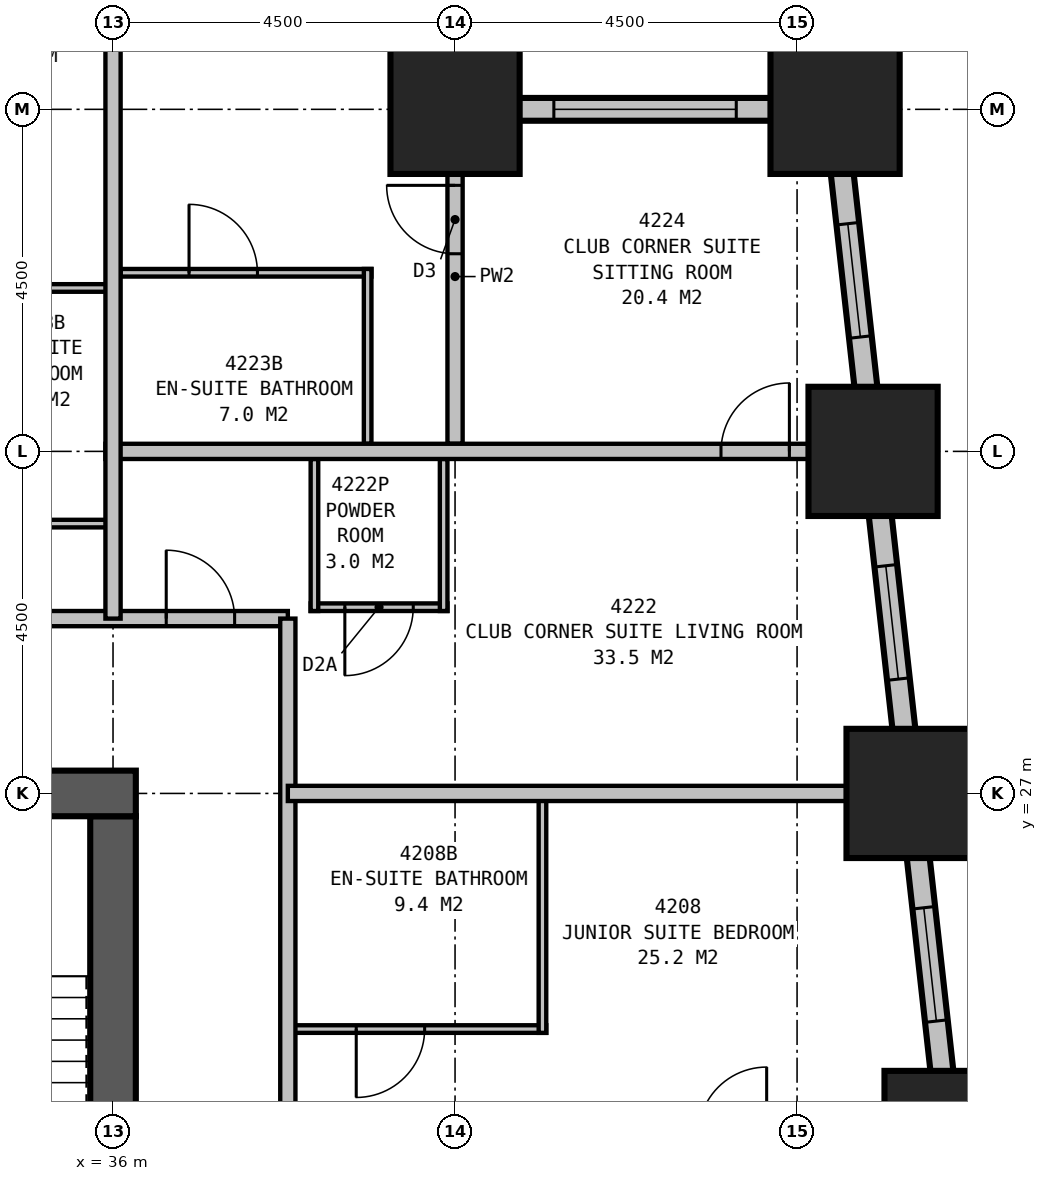
"""IFC4 building model, lengths in metres.
Left out: names, types, materials, properties, quantities, classifications, styles, units other than length and angle.
Written with IfcOpenShell. Run it as: python <this file> out.ifc"""

import sys

from ifc_helpers import new_model, si_unit, direction, frame, frame_2d, origin, origin_2d, place, context, subcontext, project, spatial, rectangle, extrude, element, fill, save


model = new_model("IFC4")
c1 = context("Model", 3, precision=1e-05, world=origin(), true_north=direction((0.0, 1.0)))
c2 = subcontext(c1, "Body", "Model", "MODEL_VIEW")
j1 = project(units=[si_unit("LENGTHUNIT", "METRE"), si_unit("PLANEANGLEUNIT", "RADIAN")], contexts=[c1])
p1 = place(None, origin())
s1 = spatial("IfcSite", under=j1, at=p1, CompositionType="ELEMENT")
p2 = place(p1, origin())
s2 = spatial("IfcBuilding", under=s1, at=p2, CompositionType="ELEMENT")
p3 = place(p2, frame((0.0, 0.0, 165.9)))
s3 = spatial("IfcBuildingStorey", under=s2, at=p3, CompositionType="ELEMENT", Elevation=165.9)
for number, where, z_axis, x_axis in (
    (1, (47.0, 22.5, 0.0), (0.0, 0.0, 1.0), (1.0, 0.0, 0.0)),
    (2, (46.5, 27.0, 0.0), (0.0, 0.0, 1.0), (1.0, 0.0, 0.0)),
    (3, (46.0, 31.5, 0.0), (0.0, 0.0, 1.0), (1.0, 0.0, 0.0)),
    (4, (45.5, 36.0, 0.0), (0.0, 0.0, 1.0), (1.0, 0.0, 0.0)),
    (5, (40.5, 36.0, 0.0), (0.0, 0.0, 1.0), (1.0, 0.0, 0.0)),
):
    element("IfcColumn", number, at=place(p3, frame(where, z_axis=z_axis, x_axis=x_axis)), inside=s3, PredefinedType="COLUMN", context=c2, shape_type="SweptSolid", body=[
        extrude(rectangle(XDim=1.7, YDim=1.7, at=origin_2d()), origin(), (0.0, 0.0, 1.0), 3.5),
    ])
p4 = place(p3, frame((36.3, 27.0, 0.0), z_axis=(0.0, 0.0, 1.0), x_axis=(-1.0, 0.0, 0.0)))
e6 = element("IfcWall", 6, at=p4, inside=s3, PredefinedType="SHEAR", context=c2, shape_type="SweptSolid", body=[
    extrude(rectangle(XDim=23.1, YDim=0.6, at=frame_2d((11.55, 0.0))), origin(), (0.0, 0.0, 1.0), 3.5),
])
p5 = place(p4, frame((17.05, 0.0, 0.0)))
e7 = element("IfcOpeningElement", 7, at=p5, cuts=e6, PredefinedType="OPENING", context=c2, shape_type="SweptSolid", body=[
    extrude(rectangle(XDim=1.0, YDim=2.1, at=frame_2d((0.5, 1.05))), frame((0.0, 0.31, 0.0), z_axis=(0.0, -1.0, 0.0), x_axis=(1.0, 0.0, 0.0)), (0.0, 0.0, 1.0), 0.62),
])
p6 = place(p4, frame((12.05, 0.0, 0.0)))
e8 = element("IfcOpeningElement", 8, at=p6, cuts=e6, PredefinedType="OPENING", context=c2, shape_type="SweptSolid", body=[
    extrude(rectangle(XDim=1.0, YDim=2.1, at=frame_2d((0.5, 1.05))), frame((0.0, 0.31, 0.0), z_axis=(0.0, -1.0, 0.0), x_axis=(1.0, 0.0, 0.0)), (0.0, 0.0, 1.0), 0.62),
])
p7 = place(p4, frame((7.05, 0.0, 0.0)))
e9 = element("IfcOpeningElement", 9, at=p7, cuts=e6, PredefinedType="OPENING", context=c2, shape_type="SweptSolid", body=[
    extrude(rectangle(XDim=1.0, YDim=2.1, at=frame_2d((0.5, 1.05))), frame((0.0, 0.31, 0.0), z_axis=(0.0, -1.0, 0.0), x_axis=(1.0, 0.0, 0.0)), (0.0, 0.0, 1.0), 0.62),
])
p8 = place(p3, frame((36.0, 20.0, 0.0), z_axis=(0.0, 0.0, 1.0), x_axis=(0.0, 1.0, 0.0)))
e10 = element("IfcWall", 10, at=p8, inside=s3, PredefinedType="SHEAR", context=c2, shape_type="SweptSolid", body=[
    extrude(rectangle(XDim=6.7, YDim=0.6, at=frame_2d((3.35, 0.0))), origin(), (0.0, 0.0, 1.0), 3.5),
])
p9 = place(p3, frame((49.017, 4.351, 0.0), z_axis=(0.0, 0.0, 1.0), x_axis=(-0.110433201132, 0.993883548555, 0.0)))
e11 = element("IfcWall", 11, at=p9, inside=s3, PredefinedType="STANDARD", context=c2, shape_type="SweptSolid", body=[
    extrude(rectangle(XDim=31.994, YDim=0.3, at=frame_2d((15.997, 0.0))), origin(), (0.0, 0.0, 1.0), 2.25),
])
p10 = place(p9, frame((1.664, 0.0, 0.5)))
e12 = element("IfcOpeningElement", 12, at=p10, cuts=e11, PredefinedType="OPENING", context=c2, shape_type="SweptSolid", body=[
    extrude(rectangle(XDim=1.5, YDim=1.6, at=frame_2d((0.75, 0.8))), frame((0.0, 0.16, 0.0), z_axis=(0.0, -1.0, 0.0), x_axis=(1.0, 0.0, 0.0)), (0.0, 0.0, 1.0), 0.32),
])
p11 = place(p9, frame((6.192, 0.0, 0.5)))
e13 = element("IfcOpeningElement", 13, at=p11, cuts=e11, PredefinedType="OPENING", context=c2, shape_type="SweptSolid", body=[
    extrude(rectangle(XDim=1.5, YDim=1.6, at=frame_2d((0.75, 0.8))), frame((0.0, 0.16, 0.0), z_axis=(0.0, -1.0, 0.0), x_axis=(1.0, 0.0, 0.0)), (0.0, 0.0, 1.0), 0.32),
])
p12 = place(p9, frame((10.719, 0.0, 0.5)))
e14 = element("IfcOpeningElement", 14, at=p12, cuts=e11, PredefinedType="OPENING", context=c2, shape_type="SweptSolid", body=[
    extrude(rectangle(XDim=1.5, YDim=1.6, at=frame_2d((0.75, 0.8))), frame((0.0, 0.16, 0.0), z_axis=(0.0, -1.0, 0.0), x_axis=(1.0, 0.0, 0.0)), (0.0, 0.0, 1.0), 0.32),
])
p13 = place(p9, frame((15.247, 0.0, 0.5)))
e15 = element("IfcOpeningElement", 15, at=p13, cuts=e11, PredefinedType="OPENING", context=c2, shape_type="SweptSolid", body=[
    extrude(rectangle(XDim=1.5, YDim=1.6, at=frame_2d((0.75, 0.8))), frame((0.0, 0.16, 0.0), z_axis=(0.0, -1.0, 0.0), x_axis=(1.0, 0.0, 0.0)), (0.0, 0.0, 1.0), 0.32),
])
p14 = place(p9, frame((19.775, 0.0, 0.5)))
e16 = element("IfcOpeningElement", 16, at=p14, cuts=e11, PredefinedType="OPENING", context=c2, shape_type="SweptSolid", body=[
    extrude(rectangle(XDim=1.5, YDim=1.6, at=frame_2d((0.75, 0.8))), frame((0.0, 0.16, 0.0), z_axis=(0.0, -1.0, 0.0), x_axis=(1.0, 0.0, 0.0)), (0.0, 0.0, 1.0), 0.32),
])
p15 = place(p9, frame((24.302, 0.0, 0.5)))
e17 = element("IfcOpeningElement", 17, at=p15, cuts=e11, PredefinedType="OPENING", context=c2, shape_type="SweptSolid", body=[
    extrude(rectangle(XDim=1.5, YDim=1.6, at=frame_2d((0.75, 0.8))), frame((0.0, 0.16, 0.0), z_axis=(0.0, -1.0, 0.0), x_axis=(1.0, 0.0, 0.0)), (0.0, 0.0, 1.0), 0.32),
])
p16 = place(p9, frame((28.83, 0.0, 0.5)))
e18 = element("IfcOpeningElement", 18, at=p16, cuts=e11, PredefinedType="OPENING", context=c2, shape_type="SweptSolid", body=[
    extrude(rectangle(XDim=1.5, YDim=1.6, at=frame_2d((0.75, 0.8))), frame((0.0, 0.16, 0.0), z_axis=(0.0, -1.0, 0.0), x_axis=(1.0, 0.0, 0.0)), (0.0, 0.0, 1.0), 0.32),
])
p17 = place(p3, frame((45.65, 36.0, 0.0), z_axis=(0.0, 0.0, 1.0), x_axis=(-1.0, 0.0, 0.0)))
e19 = element("IfcWall", 19, at=p17, inside=s3, PredefinedType="STANDARD", context=c2, shape_type="SweptSolid", body=[
    extrude(rectangle(XDim=5.3, YDim=0.3, at=frame_2d((2.65, 0.0))), origin(), (0.0, 0.0, 1.0), 2.25),
])
p18 = place(p17, frame((1.45, 0.0, 0.5)))
e20 = element("IfcOpeningElement", 20, at=p18, cuts=e19, PredefinedType="OPENING", context=c2, shape_type="SweptSolid", body=[
    extrude(rectangle(XDim=2.4, YDim=1.6, at=frame_2d((1.2, 0.8))), frame((0.0, 0.16, 0.0), z_axis=(0.0, -1.0, 0.0), x_axis=(1.0, 0.0, 0.0)), (0.0, 0.0, 1.0), 0.32),
])
p19 = place(p3, frame((40.5, 35.85, 0.0), z_axis=(0.0, 0.0, 1.0), x_axis=(0.0, 1.0, 0.0)))
e21 = element("IfcWall", 21, at=p19, inside=s3, PredefinedType="STANDARD", context=c2, shape_type="SweptSolid", body=[
    extrude(rectangle(XDim=4.8, YDim=0.3, at=frame_2d((2.4, 0.0))), origin(), (0.0, 0.0, 1.0), 2.25),
])
p20 = place(p19, frame((1.2, 0.0, 0.5)))
e22 = element("IfcOpeningElement", 22, at=p20, cuts=e21, PredefinedType="OPENING", context=c2, shape_type="SweptSolid", body=[
    extrude(rectangle(XDim=2.4, YDim=1.6, at=frame_2d((1.2, 0.8))), frame((0.0, 0.16, 0.0), z_axis=(0.0, -1.0, 0.0), x_axis=(1.0, 0.0, 0.0)), (0.0, 0.0, 1.0), 0.32),
])
p21 = place(p3, frame((11.2, 29.3, 0.0), z_axis=(0.0, 0.0, 1.0), x_axis=(1.0, 0.0, 0.0)))
e23 = element("IfcWall", 23, at=p21, inside=s3, PredefinedType="PARTITIONING", context=c2, shape_type="SweptSolid", body=[
    extrude(rectangle(XDim=27.1, YDim=0.2, at=frame_2d((13.55, 0.0))), origin(), (0.0, 0.0, 1.0), 3.25),
])
p22 = place(p21, frame((2.75, 0.0, 0.0)))
e24 = element("IfcOpeningElement", 24, at=p22, cuts=e23, PredefinedType="OPENING", context=c2, shape_type="SweptSolid", body=[
    extrude(rectangle(XDim=0.9, YDim=2.1, at=frame_2d((0.45, 1.05))), frame((0.0, 0.11, 0.0), z_axis=(0.0, -1.0, 0.0), x_axis=(1.0, 0.0, 0.0)), (0.0, 0.0, 1.0), 0.22),
])
p23 = place(p21, frame((9.55, 0.0, 0.0)))
e25 = element("IfcOpeningElement", 25, at=p23, cuts=e23, PredefinedType="OPENING", context=c2, shape_type="SweptSolid", body=[
    extrude(rectangle(XDim=0.9, YDim=2.1, at=frame_2d((0.45, 1.05))), frame((0.0, 0.11, 0.0), z_axis=(0.0, -1.0, 0.0), x_axis=(1.0, 0.0, 0.0)), (0.0, 0.0, 1.0), 0.22),
])
p24 = place(p21, frame((16.25, 0.0, 0.0)))
e26 = element("IfcOpeningElement", 26, at=p24, cuts=e23, PredefinedType="OPENING", context=c2, shape_type="SweptSolid", body=[
    extrude(rectangle(XDim=0.9, YDim=2.1, at=frame_2d((0.45, 1.05))), frame((0.0, 0.11, 0.0), z_axis=(0.0, -1.0, 0.0), x_axis=(1.0, 0.0, 0.0)), (0.0, 0.0, 1.0), 0.22),
])
p25 = place(p21, frame((20.75, 0.0, 0.0)))
e27 = element("IfcOpeningElement", 27, at=p25, cuts=e23, PredefinedType="OPENING", context=c2, shape_type="SweptSolid", body=[
    extrude(rectangle(XDim=0.9, YDim=2.1, at=frame_2d((0.45, 1.05))), frame((0.0, 0.11, 0.0), z_axis=(0.0, -1.0, 0.0), x_axis=(1.0, 0.0, 0.0)), (0.0, 0.0, 1.0), 0.22),
])
p26 = place(p21, frame((25.5, 0.0, 0.0)))
e28 = element("IfcOpeningElement", 28, at=p26, cuts=e23, PredefinedType="OPENING", context=c2, shape_type="SweptSolid", body=[
    extrude(rectangle(XDim=0.9, YDim=2.1, at=frame_2d((0.45, 1.05))), frame((0.0, 0.11, 0.0), z_axis=(0.0, -1.0, 0.0), x_axis=(1.0, 0.0, 0.0)), (0.0, 0.0, 1.0), 0.22),
])
p27 = place(p21, frame((0.7, 0.0, 0.0)))
e29 = element("IfcOpeningElement", 29, at=p27, cuts=e23, PredefinedType="OPENING", context=c2, shape_type="SweptSolid", body=[
    extrude(rectangle(XDim=0.9, YDim=2.1, at=frame_2d((0.45, 1.05))), frame((0.0, 0.11, 0.0), z_axis=(0.0, -1.0, 0.0), x_axis=(1.0, 0.0, 0.0)), (0.0, 0.0, 1.0), 0.22),
])
p28 = place(p3, frame((38.3, 10.6, 0.0), z_axis=(0.0, 0.0, 1.0), x_axis=(0.0, 1.0, 0.0)))
e30 = element("IfcWall", 30, at=p28, inside=s3, PredefinedType="PARTITIONING", context=c2, shape_type="SweptSolid", body=[
    extrude(rectangle(XDim=18.7, YDim=0.2, at=frame_2d((9.35, 0.0))), origin(), (0.0, 0.0, 1.0), 3.25),
])
p29 = place(p28, frame((6.95, 0.0, 0.0), z_axis=(0.0, 0.0, 1.0), x_axis=(-1.0, 0.0, 0.0)))
e31 = element("IfcOpeningElement", 31, at=p29, cuts=e30, PredefinedType="OPENING", context=c2, shape_type="SweptSolid", body=[
    extrude(rectangle(XDim=0.9, YDim=2.1, at=frame_2d((0.45, 1.05))), frame((0.0, 0.11, 0.0), z_axis=(0.0, -1.0, 0.0), x_axis=(1.0, 0.0, 0.0)), (0.0, 0.0, 1.0), 0.22),
])
p30 = place(p28, frame((11.05, 0.0, 0.0), z_axis=(0.0, 0.0, 1.0), x_axis=(-1.0, 0.0, 0.0)))
e32 = element("IfcOpeningElement", 32, at=p30, cuts=e30, PredefinedType="OPENING", context=c2, shape_type="SweptSolid", body=[
    extrude(rectangle(XDim=0.9, YDim=2.1, at=frame_2d((0.45, 1.05))), frame((0.0, 0.11, 0.0), z_axis=(0.0, -1.0, 0.0), x_axis=(1.0, 0.0, 0.0)), (0.0, 0.0, 1.0), 0.22),
])
p31 = place(p3, frame((41.65, 23.85, 0.0), z_axis=(0.0, 0.0, 1.0), x_axis=(0.0, 1.0, 0.0)))
e33 = element("IfcWall", 33, at=p31, inside=s3, PredefinedType="PLUMBINGWALL", context=c2, shape_type="SweptSolid", body=[
    extrude(rectangle(XDim=3.15, YDim=0.1, at=frame_2d((1.575, 0.0))), origin(), (0.0, 0.0, 1.0), 3.25),
])
p32 = place(p3, frame((38.3, 23.9, 0.0), z_axis=(0.0, 0.0, 1.0), x_axis=(1.0, 0.0, 0.0)))
e34 = element("IfcWall", 34, at=p32, inside=s3, PredefinedType="PLUMBINGWALL", context=c2, shape_type="SweptSolid", body=[
    extrude(rectangle(XDim=3.4, YDim=0.1, at=frame_2d((1.7, 0.0))), origin(), (0.0, 0.0, 1.0), 3.25),
])
p33 = place(p32, frame((1.8, 0.0, 0.0), z_axis=(0.0, 0.0, 1.0), x_axis=(-1.0, 0.0, 0.0)))
e35 = element("IfcOpeningElement", 35, at=p33, cuts=e34, PredefinedType="OPENING", context=c2, shape_type="SweptSolid", body=[
    extrude(rectangle(XDim=0.9, YDim=2.1, at=frame_2d((0.45, 1.05))), frame((0.0, 0.06, 0.0), z_axis=(0.0, -1.0, 0.0), x_axis=(1.0, 0.0, 0.0)), (0.0, 0.0, 1.0), 0.12),
])
for number, where, z_axis, x_axis in (
    (36, (33.2, 30.55, 0.0), (0.0, 0.0, 1.0), (1.0, 0.0, 0.0)),
    (37, (33.2, 33.65, 0.0), (0.0, 0.0, 1.0), (1.0, 0.0, 0.0)),
):
    element("IfcWall", number, at=place(p3, frame(where, z_axis=z_axis, x_axis=x_axis)), inside=s3, PredefinedType="PLUMBINGWALL", context=c2, shape_type="SweptSolid", body=[
        extrude(rectangle(XDim=2.8, YDim=0.1, at=frame_2d((1.4, 0.0))), origin(), (0.0, 0.0, 1.0), 3.25),
    ])
p34 = place(p3, frame((38.3, 27.0, 0.0), z_axis=(0.0, 0.0, 1.0), x_axis=(1.0, 0.0, 0.0)))
e38 = element("IfcWall", 38, at=p34, inside=s3, PredefinedType="PARTITIONING", context=c2, shape_type="SweptSolid", body=[
    extrude(rectangle(XDim=7.977, YDim=0.2, at=frame_2d((3.988, 0.0))), origin(), (0.0, 0.0, 1.0), 1.95),
])
p35 = place(p3, frame((36.0, 29.3, 0.0), z_axis=(0.0, 0.0, 1.0), x_axis=(0.0, 1.0, 0.0)))
e39 = element("IfcWall", 39, at=p35, inside=s3, PredefinedType="PARTITIONING", context=c2, shape_type="SweptSolid", body=[
    extrude(rectangle(XDim=11.2, YDim=0.2, at=frame_2d((5.6, 0.0))), origin(), (0.0, 0.0, 1.0), 2.25),
])
p36 = place(p3, frame((35.9, 31.5, 0.0), z_axis=(0.0, 0.0, 1.0), x_axis=(1.0, 0.0, 0.0)))
e40 = element("IfcWall", 40, at=p36, inside=s3, PredefinedType="PARTITIONING", context=c2, shape_type="SweptSolid", body=[
    extrude(rectangle(XDim=10.099, YDim=0.2, at=frame_2d((5.05, 0.0))), origin(), (0.0, 0.0, 1.0), 3.25),
])
p37 = place(p36, frame((8.099, 0.0, 0.0)))
e41 = element("IfcOpeningElement", 41, at=p37, cuts=e40, PredefinedType="OPENING", context=c2, shape_type="SweptSolid", body=[
    extrude(rectangle(XDim=0.9, YDim=2.1, at=frame_2d((0.45, 1.05))), frame((0.0, 0.11, 0.0), z_axis=(0.0, -1.0, 0.0), x_axis=(1.0, 0.0, 0.0)), (0.0, 0.0, 1.0), 0.22),
])
p38 = place(p3, frame((40.35, 31.4, 0.0), z_axis=(0.0, 0.0, 1.0), x_axis=(0.0, -1.0, 0.0)))
e42 = element("IfcWall", 42, at=p38, inside=s3, PredefinedType="PLUMBINGWALL", context=c2, shape_type="SweptSolid", body=[
    extrude(rectangle(XDim=2.0, YDim=0.1, at=frame_2d((1.0, 0.0))), origin(), (0.0, 0.0, 1.0), 2.25),
])
p39 = place(p3, frame((38.65, 31.4, 0.0), z_axis=(0.0, 0.0, 1.0), x_axis=(0.0, -1.0, 0.0)))
e43 = element("IfcWall", 43, at=p39, inside=s3, PredefinedType="PLUMBINGWALL", context=c2, shape_type="SweptSolid", body=[
    extrude(rectangle(XDim=2.0, YDim=0.1, at=frame_2d((1.0, 0.0))), origin(), (0.0, 0.0, 1.0), 3.25),
])
p40 = place(p3, frame((38.6, 29.45, 0.0), z_axis=(0.0, 0.0, 1.0), x_axis=(1.0, 0.0, 0.0)))
e44 = element("IfcWall", 44, at=p40, inside=s3, PredefinedType="PLUMBINGWALL", context=c2, shape_type="SweptSolid", body=[
    extrude(rectangle(XDim=1.8, YDim=0.1, at=frame_2d((0.9, 0.0))), origin(), (0.0, 0.0, 1.0), 3.25),
])
p41 = place(p40, frame((1.35, 0.0, 0.0), z_axis=(0.0, 0.0, 1.0), x_axis=(-1.0, 0.0, 0.0)))
e45 = element("IfcOpeningElement", 45, at=p41, cuts=e44, PredefinedType="OPENING", context=c2, shape_type="SweptSolid", body=[
    extrude(rectangle(XDim=0.9, YDim=2.1, at=frame_2d((0.45, 1.05))), frame((0.0, 0.06, 0.0), z_axis=(0.0, -1.0, 0.0), x_axis=(1.0, 0.0, 0.0)), (0.0, 0.0, 1.0), 0.12),
])
p42 = place(p3, frame((40.5, 31.6, 0.0), z_axis=(0.0, 0.0, 1.0), x_axis=(0.0, 1.0, 0.0)))
e46 = element("IfcWall", 46, at=p42, inside=s3, PredefinedType="PARTITIONING", context=c2, shape_type="SweptSolid", body=[
    extrude(rectangle(XDim=4.4, YDim=0.2, at=frame_2d((2.2, 0.0))), origin(), (0.0, 0.0, 1.0), 2.25),
])
p43 = place(p42, frame((2.5, 0.0, 0.0)))
e47 = element("IfcOpeningElement", 47, at=p43, cuts=e46, PredefinedType="OPENING", context=c2, shape_type="SweptSolid", body=[
    extrude(rectangle(XDim=0.9, YDim=2.1, at=frame_2d((0.45, 1.05))), frame((0.0, 0.11, 0.0), z_axis=(0.0, -1.0, 0.0), x_axis=(1.0, 0.0, 0.0)), (0.0, 0.0, 1.0), 0.22),
])
p44 = place(p3, frame((39.35, 31.6, 0.0), z_axis=(0.0, 0.0, 1.0), x_axis=(0.0, 1.0, 0.0)))
e48 = element("IfcWall", 48, at=p44, inside=s3, PredefinedType="PLUMBINGWALL", context=c2, shape_type="SweptSolid", body=[
    extrude(rectangle(XDim=2.3, YDim=0.1, at=frame_2d((1.15, 0.0))), origin(), (0.0, 0.0, 1.0), 3.25),
])
p45 = place(p3, frame((36.1, 33.85, 0.0), z_axis=(0.0, 0.0, 1.0), x_axis=(1.0, 0.0, 0.0)))
e49 = element("IfcWall", 49, at=p45, inside=s3, PredefinedType="PLUMBINGWALL", context=c2, shape_type="SweptSolid", body=[
    extrude(rectangle(XDim=3.3, YDim=0.1, at=frame_2d((1.65, 0.0))), origin(), (0.0, 0.0, 1.0), 3.25),
])
p46 = place(p45, frame((0.9, 0.0, 0.0)))
e50 = element("IfcOpeningElement", 50, at=p46, cuts=e49, PredefinedType="OPENING", context=c2, shape_type="SweptSolid", body=[
    extrude(rectangle(XDim=0.9, YDim=2.1, at=frame_2d((0.45, 1.05))), frame((0.0, 0.06, 0.0), z_axis=(0.0, -1.0, 0.0), x_axis=(1.0, 0.0, 0.0)), (0.0, 0.0, 1.0), 0.12),
])
p47 = place(p14, origin())
e51 = element("IfcWindow", 51, at=p47, inside=s3, PartitioningType="SINGLE_PANEL", PredefinedType="WINDOW", context=c2, shape_type="SweptSolid", body=[
    extrude(rectangle(XDim=1.5, YDim=1.6, at=frame_2d((0.75, 0.8))), frame((0.0, 0.03, 0.0), z_axis=(0.0, -1.0, 0.0), x_axis=(1.0, 0.0, 0.0)), (0.0, 0.0, 1.0), 0.06),
])
fill(e16, e51)
p48 = place(p15, origin())
e52 = element("IfcWindow", 52, at=p48, inside=s3, PartitioningType="SINGLE_PANEL", PredefinedType="WINDOW", context=c2, shape_type="SweptSolid", body=[
    extrude(rectangle(XDim=1.5, YDim=1.6, at=frame_2d((0.75, 0.8))), frame((0.0, 0.03, 0.0), z_axis=(0.0, -1.0, 0.0), x_axis=(1.0, 0.0, 0.0)), (0.0, 0.0, 1.0), 0.06),
])
fill(e17, e52)
p49 = place(p16, origin())
e53 = element("IfcWindow", 53, at=p49, inside=s3, PartitioningType="SINGLE_PANEL", PredefinedType="WINDOW", context=c2, shape_type="SweptSolid", body=[
    extrude(rectangle(XDim=1.5, YDim=1.6, at=frame_2d((0.75, 0.8))), frame((0.0, 0.03, 0.0), z_axis=(0.0, -1.0, 0.0), x_axis=(1.0, 0.0, 0.0)), (0.0, 0.0, 1.0), 0.06),
])
fill(e18, e53)
p50 = place(p18, origin())
e54 = element("IfcWindow", 54, at=p50, inside=s3, PartitioningType="SINGLE_PANEL", PredefinedType="WINDOW", context=c2, shape_type="SweptSolid", body=[
    extrude(rectangle(XDim=2.4, YDim=1.6, at=frame_2d((1.2, 0.8))), frame((0.0, 0.03, 0.0), z_axis=(0.0, -1.0, 0.0), x_axis=(1.0, 0.0, 0.0)), (0.0, 0.0, 1.0), 0.06),
])
fill(e20, e54)
p51 = place(p26, origin())
e55 = element("IfcDoor", 55, at=p51, inside=s3, OperationType="SINGLE_SWING_LEFT", PredefinedType="DOOR", context=c2, shape_type="SweptSolid", body=[
    extrude(rectangle(XDim=0.9, YDim=2.1, at=frame_2d((0.45, 1.05))), frame((0.0, 0.025, 0.0), z_axis=(0.0, -1.0, 0.0), x_axis=(1.0, 0.0, 0.0)), (0.0, 0.0, 1.0), 0.05),
])
fill(e28, e55)
p52 = place(p33, origin())
e56 = element("IfcDoor", 56, at=p52, inside=s3, OperationType="SINGLE_SWING_RIGHT", PredefinedType="DOOR", context=c2, shape_type="SweptSolid", body=[
    extrude(rectangle(XDim=0.9, YDim=2.1, at=frame_2d((0.45, 1.05))), frame((0.0, 0.025, 0.0), z_axis=(0.0, -1.0, 0.0), x_axis=(1.0, 0.0, 0.0)), (0.0, 0.0, 1.0), 0.05),
])
fill(e35, e56)
p53 = place(p37, origin())
e57 = element("IfcDoor", 57, at=p53, inside=s3, OperationType="SINGLE_SWING_RIGHT", PredefinedType="DOOR", context=c2, shape_type="SweptSolid", body=[
    extrude(rectangle(XDim=0.9, YDim=2.1, at=frame_2d((0.45, 1.05))), frame((0.0, 0.025, 0.0), z_axis=(0.0, -1.0, 0.0), x_axis=(1.0, 0.0, 0.0)), (0.0, 0.0, 1.0), 0.05),
])
fill(e41, e57)
p54 = place(p41, origin())
e58 = element("IfcDoor", 58, at=p54, inside=s3, OperationType="SINGLE_SWING_RIGHT", PredefinedType="DOOR", context=c2, shape_type="SweptSolid", body=[
    extrude(rectangle(XDim=0.9, YDim=2.1, at=frame_2d((0.45, 1.05))), frame((0.0, 0.025, 0.0), z_axis=(0.0, -1.0, 0.0), x_axis=(1.0, 0.0, 0.0)), (0.0, 0.0, 1.0), 0.05),
])
fill(e45, e58)
p55 = place(p43, origin())
e59 = element("IfcDoor", 59, at=p55, inside=s3, OperationType="SINGLE_SWING_RIGHT", PredefinedType="DOOR", context=c2, shape_type="SweptSolid", body=[
    extrude(rectangle(XDim=0.9, YDim=2.1, at=frame_2d((0.45, 1.05))), frame((0.0, 0.025, 0.0), z_axis=(0.0, -1.0, 0.0), x_axis=(1.0, 0.0, 0.0)), (0.0, 0.0, 1.0), 0.05),
])
fill(e47, e59)
p56 = place(p46, origin())
e60 = element("IfcDoor", 60, at=p56, inside=s3, OperationType="SINGLE_SWING_LEFT", PredefinedType="DOOR", context=c2, shape_type="SweptSolid", body=[
    extrude(rectangle(XDim=0.9, YDim=2.1, at=frame_2d((0.45, 1.05))), frame((0.0, 0.025, 0.0), z_axis=(0.0, -1.0, 0.0), x_axis=(1.0, 0.0, 0.0)), (0.0, 0.0, 1.0), 0.05),
])
fill(e50, e60)
save(model, sys.argv[1])
